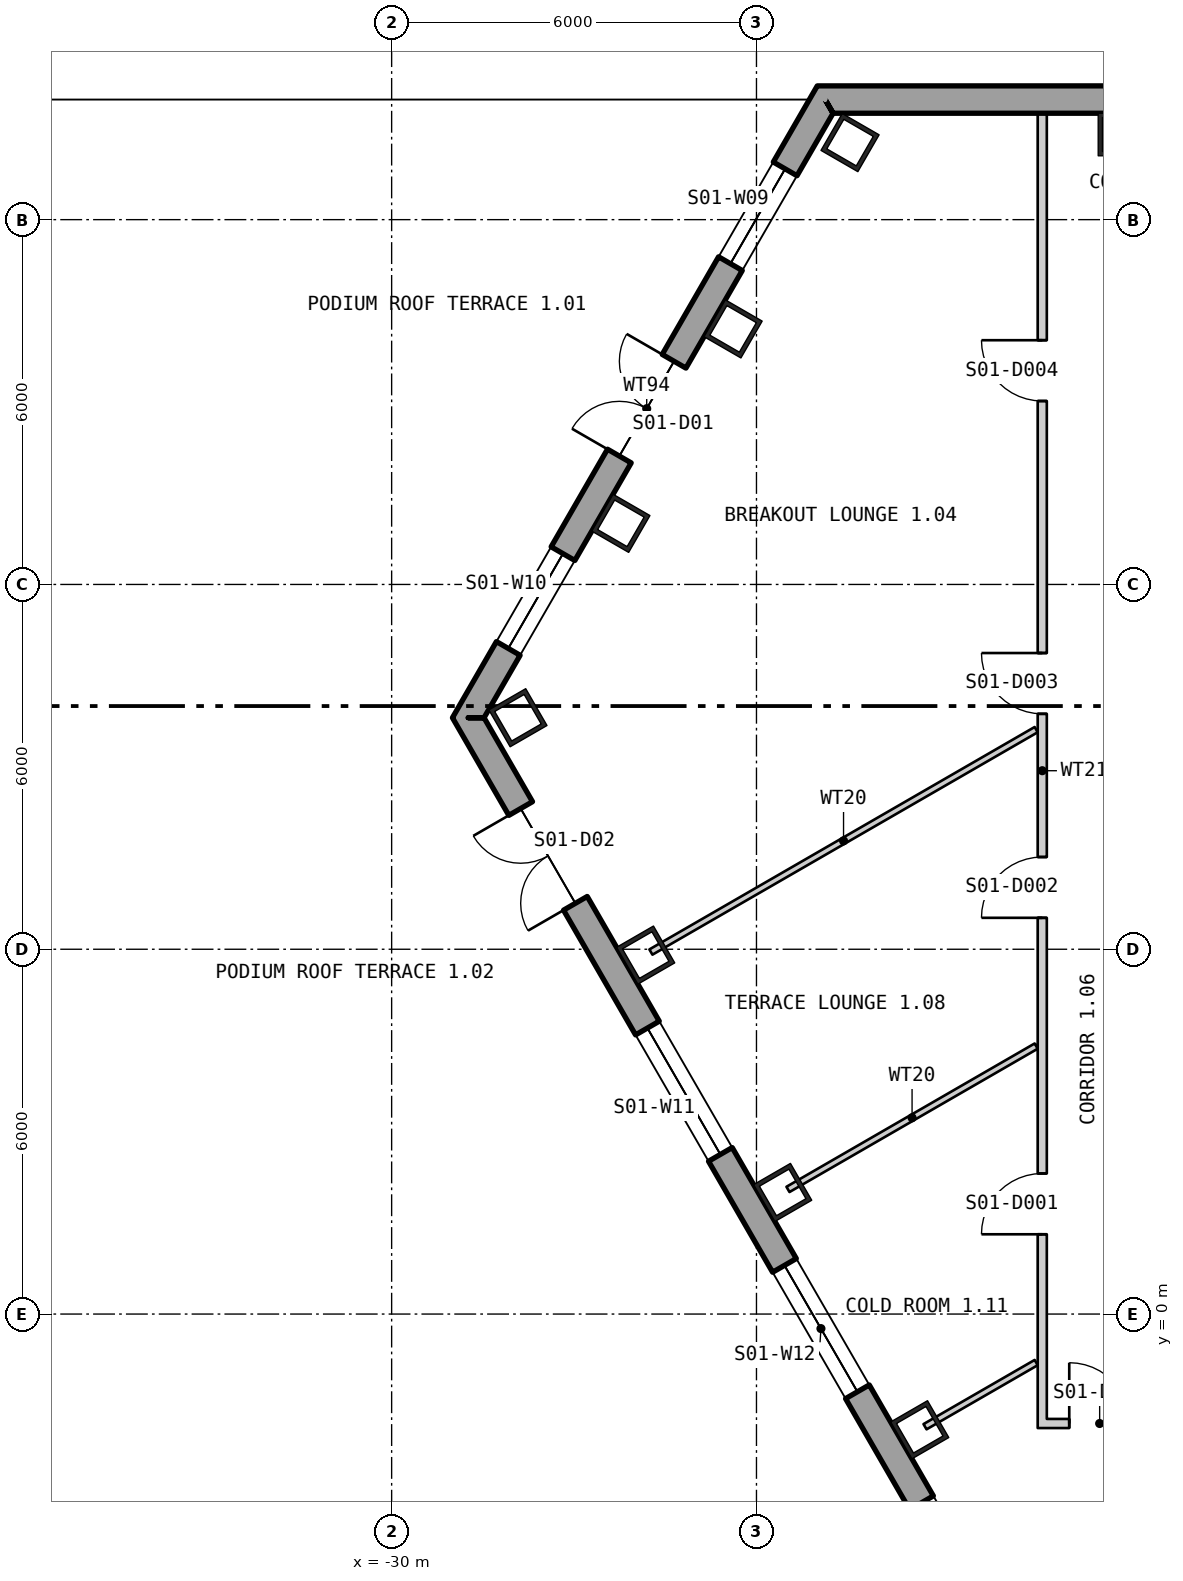
"""IFC4 building model, lengths in metres.
Left out: names, types, materials, properties, quantities, classifications, styles, units other than length and angle.
Written with IfcOpenShell. Run it as: python <this file> out.ifc"""

import sys

from ifc_helpers import new_model, si_unit, direction, frame, frame_2d, origin, origin_2d, place, context, subcontext, project, spatial, polyline, rectangle, hollow_rectangle, outline, extrude, element, fill, save


model = new_model("IFC4")
c1 = context("Model", 3, precision=1e-05, world=origin(), true_north=direction((0.0, 1.0)))
c2 = subcontext(c1, "Body", "Model", "MODEL_VIEW")
j1 = project(units=[si_unit("LENGTHUNIT", "METRE"), si_unit("PLANEANGLEUNIT", "RADIAN")], contexts=[c1])
p1 = place(None, origin())
s1 = spatial("IfcSite", under=j1, at=p1, CompositionType="ELEMENT")
p2 = place(p1, origin())
s2 = spatial("IfcBuilding", under=s1, at=p2, CompositionType="ELEMENT")
p3 = place(p2, frame((0.0, 0.0, 28.8)))
s3 = spatial("IfcBuildingStorey", under=s2, at=p3, CompositionType="ELEMENT", Elevation=28.8)
p4 = place(p3, frame((-18.03, 19.4, -0.85), z_axis=(0.0, 0.0, 1.0), x_axis=(-1.0, 0.0, 0.0)))
e1 = element("IfcColumn", 1, at=p4, inside=s3, PredefinedType="COLUMN", context=c2, shape_type="SweptSolid", body=[
    extrude(hollow_rectangle(XDim=0.7, YDim=0.7, WallThickness=0.07, at=origin_2d()), origin(), (0.0, 0.0, 1.0), 5.35),
])
p5 = place(p3, frame((-22.461, 19.267, 0.0), z_axis=(0.0, 0.0, 1.0), x_axis=(-0.5, -0.866025403784, 0.0)))
e2 = element("IfcColumn", 2, at=p5, inside=s3, PredefinedType="COLUMN", context=c2, shape_type="SweptSolid", body=[
    extrude(hollow_rectangle(XDim=0.7, YDim=0.7, WallThickness=0.07, at=origin_2d()), origin(), (0.0, 0.0, 1.0), 4.5),
])
for number, where, z_axis, x_axis in (
    (3, (-24.384, 16.203, -0.85), (0.0, 0.0, 1.0), (-0.5, -0.866, 0.0)),
    (4, (-26.23, 13.005, -0.85), (0.0, 0.0, 1.0), (-0.5, -0.866, 0.0)),
):
    element("IfcColumn", number, at=place(p3, frame(where, z_axis=z_axis, x_axis=x_axis)), inside=s3, PredefinedType="COLUMN", context=c2, shape_type="SweptSolid", body=[
        extrude(hollow_rectangle(XDim=0.7, YDim=0.7, WallThickness=0.07, at=origin_2d()), origin(), (0.0, 0.0, 1.0), 5.35),
    ])
p6 = place(p3, frame((-27.923, 9.808, 0.0), z_axis=(0.0, 0.0, 1.0), x_axis=(0.5, -0.866025403784, 0.0)))
e5 = element("IfcColumn", 5, at=p6, inside=s3, PredefinedType="COLUMN", context=c2, shape_type="SweptSolid", body=[
    extrude(hollow_rectangle(XDim=0.7, YDim=0.7, WallThickness=0.07, at=origin_2d()), origin(), (0.0, 0.0, 1.0), 4.5),
])
p7 = place(p3, frame((-25.822, 5.904, -0.85), z_axis=(0.0, 0.0, 1.0), x_axis=(0.5, -0.866025403784, 0.0)))
e6 = element("IfcColumn", 6, at=p7, inside=s3, PredefinedType="COLUMN", context=c2, shape_type="SweptSolid", body=[
    extrude(hollow_rectangle(XDim=0.7, YDim=0.7, WallThickness=0.07, at=origin_2d()), origin(), (0.0, 0.0, 1.0), 5.35),
])
p8 = place(p3, frame((-23.569, 2.0, 0.0), z_axis=(0.0, 0.0, 1.0), x_axis=(0.5, -0.866025403784, 0.0)))
e7 = element("IfcColumn", 7, at=p8, inside=s3, PredefinedType="COLUMN", context=c2, shape_type="SweptSolid", body=[
    extrude(hollow_rectangle(XDim=0.7, YDim=0.7, WallThickness=0.07, at=origin_2d()), origin(), (0.0, 0.0, 1.0), 4.5),
])
p9 = place(p3, frame((-21.315, -1.903, -0.85), z_axis=(0.0, 0.0, 1.0), x_axis=(0.5, -0.866025403784, 0.0)))
e8 = element("IfcColumn", 8, at=p9, inside=s3, PredefinedType="COLUMN", context=c2, shape_type="SweptSolid", body=[
    extrude(hollow_rectangle(XDim=0.7, YDim=0.7, WallThickness=0.07, at=origin_2d()), origin(), (0.0, 0.0, 1.0), 5.35),
])
p10 = place(p3, frame((22.87, 19.975, -0.4), z_axis=(0.0, 0.0, 1.0), x_axis=(-1.0, 0.0, 0.0)))
e9 = element("IfcWall", 9, at=p10, inside=s3, PredefinedType="SOLIDWALL", context=c2, shape_type="SweptSolid", body=[
    extrude(outline(polyline([(-0.13, -0.225), (45.87, -0.225), (45.61, 0.225), (0.13, 0.225), (-0.13, -0.225)])), origin(), (0.0, 0.0, 1.0), 4.5),
])
p11 = place(p10, frame((5.893, 0.0, 1.3)))
e10 = element("IfcOpeningElement", 10, at=p11, cuts=e9, PredefinedType="OPENING", context=c2, shape_type="SweptSolid", body=[
    extrude(rectangle(XDim=2.4, YDim=2.6, at=frame_2d((1.2, 1.3))), frame((0.0, 0.235, 0.0), z_axis=(0.0, -1.0, 0.0), x_axis=(1.0, 0.0, 0.0)), (0.0, 0.0, 1.0), 0.47),
])
p12 = place(p10, frame((10.401, 0.0, 1.3)))
e11 = element("IfcOpeningElement", 11, at=p12, cuts=e9, PredefinedType="OPENING", context=c2, shape_type="SweptSolid", body=[
    extrude(rectangle(XDim=2.4, YDim=2.6, at=frame_2d((1.2, 1.3))), frame((0.0, 0.235, 0.0), z_axis=(0.0, -1.0, 0.0), x_axis=(1.0, 0.0, 0.0)), (0.0, 0.0, 1.0), 0.47),
])
p13 = place(p10, frame((14.909, 0.0, 1.3)))
e12 = element("IfcOpeningElement", 12, at=p13, cuts=e9, PredefinedType="OPENING", context=c2, shape_type="SweptSolid", body=[
    extrude(rectangle(XDim=2.4, YDim=2.6, at=frame_2d((1.2, 1.3))), frame((0.0, 0.235, 0.0), z_axis=(0.0, -1.0, 0.0), x_axis=(1.0, 0.0, 0.0)), (0.0, 0.0, 1.0), 0.47),
])
p14 = place(p10, frame((19.416, 0.0, 1.3)))
e13 = element("IfcOpeningElement", 13, at=p14, cuts=e9, PredefinedType="OPENING", context=c2, shape_type="SweptSolid", body=[
    extrude(rectangle(XDim=2.4, YDim=2.6, at=frame_2d((1.2, 1.3))), frame((0.0, 0.235, 0.0), z_axis=(0.0, -1.0, 0.0), x_axis=(1.0, 0.0, 0.0)), (0.0, 0.0, 1.0), 0.47),
])
p15 = place(p10, frame((23.924, 0.0, 1.3)))
e14 = element("IfcOpeningElement", 14, at=p15, cuts=e9, PredefinedType="OPENING", context=c2, shape_type="SweptSolid", body=[
    extrude(rectangle(XDim=2.4, YDim=2.6, at=frame_2d((1.2, 1.3))), frame((0.0, 0.235, 0.0), z_axis=(0.0, -1.0, 0.0), x_axis=(1.0, 0.0, 0.0)), (0.0, 0.0, 1.0), 0.47),
])
p16 = place(p10, frame((28.431, 0.0, 1.3)))
e15 = element("IfcOpeningElement", 15, at=p16, cuts=e9, PredefinedType="OPENING", context=c2, shape_type="SweptSolid", body=[
    extrude(rectangle(XDim=2.4, YDim=2.6, at=frame_2d((1.2, 1.3))), frame((0.0, 0.235, 0.0), z_axis=(0.0, -1.0, 0.0), x_axis=(1.0, 0.0, 0.0)), (0.0, 0.0, 1.0), 0.47),
])
p17 = place(p10, frame((32.939, 0.0, 1.3)))
e16 = element("IfcOpeningElement", 16, at=p17, cuts=e9, PredefinedType="OPENING", context=c2, shape_type="SweptSolid", body=[
    extrude(rectangle(XDim=2.4, YDim=2.6, at=frame_2d((1.2, 1.3))), frame((0.0, 0.235, 0.0), z_axis=(0.0, -1.0, 0.0), x_axis=(1.0, 0.0, 0.0)), (0.0, 0.0, 1.0), 0.47),
])
p18 = place(p10, frame((37.447, 0.0, 1.3)))
e17 = element("IfcOpeningElement", 17, at=p18, cuts=e9, PredefinedType="OPENING", context=c2, shape_type="SweptSolid", body=[
    extrude(rectangle(XDim=2.4, YDim=2.6, at=frame_2d((1.2, 1.3))), frame((0.0, 0.235, 0.0), z_axis=(0.0, -1.0, 0.0), x_axis=(1.0, 0.0, 0.0)), (0.0, 0.0, 1.0), 0.47),
])
p19 = place(p3, frame((-22.87, 19.975, -0.23), z_axis=(0.0, 0.0, 1.0), x_axis=(-0.500000422144, -0.866025160059, 0.0)))
e18 = element("IfcWall", 18, at=p19, inside=s3, PredefinedType="SOLIDWALL", context=c2, shape_type="SweptSolid", body=[
    extrude(outline(polyline([(-0.13, -0.225), (11.87, -0.225), (11.61, 0.225), (0.13, 0.225), (-0.13, -0.225)])), origin(), (0.0, 0.0, 1.0), 4.33),
])
p20 = place(p19, frame((1.316, 0.0, 1.13)))
e19 = element("IfcOpeningElement", 19, at=p20, cuts=e18, PredefinedType="OPENING", context=c2, shape_type="SweptSolid", body=[
    extrude(rectangle(XDim=1.8, YDim=2.6, at=frame_2d((0.9, 1.3))), frame((0.0, 0.235, 0.0), z_axis=(0.0, -1.0, 0.0), x_axis=(1.0, 0.0, 0.0)), (0.0, 0.0, 1.0), 0.47),
])
p21 = place(p19, frame((4.97, 0.0, 0.23)))
e20 = element("IfcOpeningElement", 20, at=p21, cuts=e18, PredefinedType="OPENING", context=c2, shape_type="SweptSolid", body=[
    extrude(rectangle(XDim=1.8, YDim=2.4, at=frame_2d((0.9, 1.2))), frame((0.0, 0.235, 0.0), z_axis=(0.0, -1.0, 0.0), x_axis=(1.0, 0.0, 0.0)), (0.0, 0.0, 1.0), 0.47),
])
p22 = place(p19, frame((8.624, 0.0, 1.13)))
e21 = element("IfcOpeningElement", 21, at=p22, cuts=e18, PredefinedType="OPENING", context=c2, shape_type="SweptSolid", body=[
    extrude(rectangle(XDim=1.8, YDim=2.6, at=frame_2d((0.9, 1.3))), frame((0.0, 0.235, 0.0), z_axis=(0.0, -1.0, 0.0), x_axis=(1.0, 0.0, 0.0)), (0.0, 0.0, 1.0), 0.47),
])
p23 = place(p3, frame((-28.74, 9.808, -0.23), z_axis=(0.0, 0.0, 1.0), x_axis=(0.499999764979, -0.866025539474, 0.0)))
e22 = element("IfcWall", 22, at=p23, inside=s3, PredefinedType="SOLIDWALL", context=c2, shape_type="SweptSolid", body=[
    extrude(outline(polyline([(-0.13, -0.225), (45.87, -0.225), (45.61, 0.225), (0.13, 0.225), (-0.13, -0.225)])), origin(), (0.0, 0.0, 1.0), 4.55),
])
p24 = place(p23, frame((1.724, 0.0, 0.23)))
e23 = element("IfcOpeningElement", 23, at=p24, cuts=e22, PredefinedType="OPENING", context=c2, shape_type="SweptSolid", body=[
    extrude(rectangle(XDim=1.8, YDim=2.4, at=frame_2d((0.9, 1.2))), frame((0.0, 0.235, 0.0), z_axis=(0.0, -1.0, 0.0), x_axis=(1.0, 0.0, 0.0)), (0.0, 0.0, 1.0), 0.47),
])
p25 = place(p23, frame((5.893, 0.0, 1.13)))
e24 = element("IfcOpeningElement", 24, at=p25, cuts=e22, PredefinedType="OPENING", context=c2, shape_type="SweptSolid", body=[
    extrude(rectangle(XDim=2.4, YDim=2.6, at=frame_2d((1.2, 1.3))), frame((0.0, 0.235, 0.0), z_axis=(0.0, -1.0, 0.0), x_axis=(1.0, 0.0, 0.0)), (0.0, 0.0, 1.0), 0.47),
])
p26 = place(p23, frame((10.401, 0.0, 1.13)))
e25 = element("IfcOpeningElement", 25, at=p26, cuts=e22, PredefinedType="OPENING", context=c2, shape_type="SweptSolid", body=[
    extrude(rectangle(XDim=2.4, YDim=2.6, at=frame_2d((1.2, 1.3))), frame((0.0, 0.235, 0.0), z_axis=(0.0, -1.0, 0.0), x_axis=(1.0, 0.0, 0.0)), (0.0, 0.0, 1.0), 0.47),
])
p27 = place(p23, frame((14.909, 0.0, 1.13)))
e26 = element("IfcOpeningElement", 26, at=p27, cuts=e22, PredefinedType="OPENING", context=c2, shape_type="SweptSolid", body=[
    extrude(rectangle(XDim=2.4, YDim=2.6, at=frame_2d((1.2, 1.3))), frame((0.0, 0.235, 0.0), z_axis=(0.0, -1.0, 0.0), x_axis=(1.0, 0.0, 0.0)), (0.0, 0.0, 1.0), 0.47),
])
p28 = place(p23, frame((19.416, 0.0, 1.13)))
e27 = element("IfcOpeningElement", 27, at=p28, cuts=e22, PredefinedType="OPENING", context=c2, shape_type="SweptSolid", body=[
    extrude(rectangle(XDim=2.4, YDim=2.6, at=frame_2d((1.2, 1.3))), frame((0.0, 0.235, 0.0), z_axis=(0.0, -1.0, 0.0), x_axis=(1.0, 0.0, 0.0)), (0.0, 0.0, 1.0), 0.47),
])
p29 = place(p23, frame((23.924, 0.0, 1.13)))
e28 = element("IfcOpeningElement", 28, at=p29, cuts=e22, PredefinedType="OPENING", context=c2, shape_type="SweptSolid", body=[
    extrude(rectangle(XDim=2.4, YDim=2.6, at=frame_2d((1.2, 1.3))), frame((0.0, 0.235, 0.0), z_axis=(0.0, -1.0, 0.0), x_axis=(1.0, 0.0, 0.0)), (0.0, 0.0, 1.0), 0.47),
])
p30 = place(p23, frame((28.431, 0.0, 1.13)))
e29 = element("IfcOpeningElement", 29, at=p30, cuts=e22, PredefinedType="OPENING", context=c2, shape_type="SweptSolid", body=[
    extrude(rectangle(XDim=2.4, YDim=2.6, at=frame_2d((1.2, 1.3))), frame((0.0, 0.235, 0.0), z_axis=(0.0, -1.0, 0.0), x_axis=(1.0, 0.0, 0.0)), (0.0, 0.0, 1.0), 0.47),
])
p31 = place(p23, frame((33.239, 0.0, 0.23)))
e30 = element("IfcOpeningElement", 30, at=p31, cuts=e22, PredefinedType="OPENING", context=c2, shape_type="SweptSolid", body=[
    extrude(rectangle(XDim=1.8, YDim=2.4, at=frame_2d((0.9, 1.2))), frame((0.0, 0.235, 0.0), z_axis=(0.0, -1.0, 0.0), x_axis=(1.0, 0.0, 0.0)), (0.0, 0.0, 1.0), 0.47),
])
p32 = place(p23, frame((37.447, 0.0, 1.13)))
e31 = element("IfcOpeningElement", 31, at=p32, cuts=e22, PredefinedType="OPENING", context=c2, shape_type="SweptSolid", body=[
    extrude(rectangle(XDim=2.4, YDim=2.6, at=frame_2d((1.2, 1.3))), frame((0.0, 0.235, 0.0), z_axis=(0.0, -1.0, 0.0), x_axis=(1.0, 0.0, 0.0)), (0.0, 0.0, 1.0), 0.47),
])
p33 = place(p23, frame((41.916, 0.0, 1.13)))
e32 = element("IfcOpeningElement", 32, at=p33, cuts=e22, PredefinedType="OPENING", context=c2, shape_type="SweptSolid", body=[
    extrude(rectangle(XDim=2.4, YDim=2.6, at=frame_2d((1.2, 1.3))), frame((0.0, 0.235, 0.0), z_axis=(0.0, -1.0, 0.0), x_axis=(1.0, 0.0, 0.0)), (0.0, 0.0, 1.0), 0.47),
])
p34 = place(p3, frame((-23.0, 19.975, -0.4), z_axis=(0.0, 0.0, 1.0), x_axis=(-1.0, 0.0, 0.0)))
e33 = element("IfcWall", 33, at=p34, inside=s3, PredefinedType="PARAPET", context=c2, shape_type="SweptSolid", body=[
    extrude(outline(polyline([(0.0, -0.15), (16.0, -0.15), (15.7, 0.15), (0.0, 0.15), (0.0, -0.15)])), origin(), (0.0, 0.0, 1.0), 1.5),
])
p35 = place(p3, frame((-25.736, 5.954, 0.0), z_axis=(0.0, 0.0, 1.0), x_axis=(0.866030807744, 0.499990639951, 0.0)))
e34 = element("IfcWall", 34, at=p35, inside=s3, PredefinedType="PARTITIONING", context=c2, shape_type="SweptSolid", body=[
    extrude(rectangle(XDim=7.316, YDim=0.1, at=frame_2d((3.658, 0.0))), origin(), (0.0, 0.0, 1.0), 4.3),
])
p36 = place(p3, frame((-23.482, 2.05, 0.0), z_axis=(0.0, 0.0, 1.0), x_axis=(0.866001867101, 0.500040764516, 0.0)))
e35 = element("IfcWall", 35, at=p36, inside=s3, PredefinedType="PARTITIONING", context=c2, shape_type="SweptSolid", body=[
    extrude(rectangle(XDim=4.714, YDim=0.1, at=frame_2d((2.357, 0.0))), origin(), (0.0, 0.0, 1.0), 4.3),
])
p37 = place(p3, frame((-21.228, -1.853, 0.0), z_axis=(0.0, 0.0, 1.0), x_axis=(0.866106696208, 0.499859170951, 0.0)))
e36 = element("IfcWall", 36, at=p37, inside=s3, PredefinedType="PARTITIONING", context=c2, shape_type="SweptSolid", body=[
    extrude(rectangle(XDim=2.111, YDim=0.1, at=frame_2d((1.055, 0.0))), origin(), (0.0, 0.0, 1.0), 4.3),
])
p38 = place(p3, frame((-19.3, -1.875, 0.0), z_axis=(0.0, 0.0, 1.0), x_axis=(0.0, 1.0, 0.0)))
e37 = element("IfcWall", 37, at=p38, inside=s3, PredefinedType="PARTITIONING", context=c2, shape_type="SweptSolid", body=[
    extrude(rectangle(XDim=21.623, YDim=0.15, at=frame_2d((10.812, 0.0))), origin(), (0.0, 0.0, 1.0), 4.3),
])
p39 = place(p38, frame((3.187, 0.0, 0.0)))
e38 = element("IfcOpeningElement", 38, at=p39, cuts=e37, PredefinedType="OPENING", context=c2, shape_type="SweptSolid", body=[
    extrude(rectangle(XDim=1.0, YDim=2.1, at=frame_2d((0.5, 1.05))), frame((0.0, 0.085, 0.0), z_axis=(0.0, -1.0, 0.0), x_axis=(1.0, 0.0, 0.0)), (0.0, 0.0, 1.0), 0.17),
])
p40 = place(p38, frame((8.392, 0.0, 0.0)))
e39 = element("IfcOpeningElement", 39, at=p40, cuts=e37, PredefinedType="OPENING", context=c2, shape_type="SweptSolid", body=[
    extrude(rectangle(XDim=1.0, YDim=2.1, at=frame_2d((0.5, 1.05))), frame((0.0, 0.085, 0.0), z_axis=(0.0, -1.0, 0.0), x_axis=(1.0, 0.0, 0.0)), (0.0, 0.0, 1.0), 0.17),
])
p41 = place(p38, frame((11.747, 0.0, 0.0)))
e40 = element("IfcOpeningElement", 40, at=p41, cuts=e37, PredefinedType="OPENING", context=c2, shape_type="SweptSolid", body=[
    extrude(rectangle(XDim=1.0, YDim=2.1, at=frame_2d((0.5, 1.05))), frame((0.0, 0.085, 0.0), z_axis=(0.0, -1.0, 0.0), x_axis=(1.0, 0.0, 0.0)), (0.0, 0.0, 1.0), 0.17),
])
p42 = place(p38, frame((16.892, 0.0, 0.0)))
e41 = element("IfcOpeningElement", 41, at=p42, cuts=e37, PredefinedType="OPENING", context=c2, shape_type="SweptSolid", body=[
    extrude(rectangle(XDim=1.0, YDim=2.1, at=frame_2d((0.5, 1.05))), frame((0.0, 0.085, 0.0), z_axis=(0.0, -1.0, 0.0), x_axis=(1.0, 0.0, 0.0)), (0.0, 0.0, 1.0), 0.17),
])
p43 = place(p3, frame((-19.225, -1.8, 0.0), z_axis=(0.0, 0.0, 1.0), x_axis=(1.0, 0.0, 0.0)))
e42 = element("IfcWall", 42, at=p43, inside=s3, PredefinedType="PARTITIONING", context=c2, shape_type="SweptSolid", body=[
    extrude(rectangle(XDim=11.15, YDim=0.15, at=frame_2d((5.575, 0.0))), origin(), (0.0, 0.0, 1.0), 4.3),
])
p44 = place(p43, frame((0.369, 0.0, 0.0)))
e43 = element("IfcOpeningElement", 43, at=p44, cuts=e42, PredefinedType="OPENING", context=c2, shape_type="SweptSolid", body=[
    extrude(rectangle(XDim=1.0, YDim=2.1, at=frame_2d((0.5, 1.05))), frame((0.0, 0.085, 0.0), z_axis=(0.0, -1.0, 0.0), x_axis=(1.0, 0.0, 0.0)), (0.0, 0.0, 1.0), 0.17),
])
p45 = place(p20, origin())
e44 = element("IfcWindow", 44, at=p45, inside=s3, PartitioningType="SINGLE_PANEL", PredefinedType="WINDOW", context=c2, shape_type="SweptSolid", body=[
    extrude(rectangle(XDim=1.8, YDim=2.6, at=frame_2d((0.9, 1.3))), frame((0.0, 0.105, 0.0), z_axis=(0.0, -1.0, 0.0), x_axis=(1.0, 0.0, 0.0)), (0.0, 0.0, 1.0), 0.06),
])
fill(e19, e44)
p46 = place(p21, frame((1.8, 0.0, 0.0), z_axis=(0.0, 0.0, 1.0), x_axis=(-1.0, 0.0, 0.0)))
e45 = element("IfcDoor", 45, at=p46, inside=s3, OperationType="DOUBLE_DOOR_SINGLE_SWING", PredefinedType="DOOR", context=c2, shape_type="SweptSolid", body=[
    extrude(rectangle(XDim=1.8, YDim=2.4, at=frame_2d((0.9, 1.2))), frame((0.0, 0.025, 0.0), z_axis=(0.0, -1.0, 0.0), x_axis=(1.0, 0.0, 0.0)), (0.0, 0.0, 1.0), 0.05),
])
fill(e20, e45)
p47 = place(p22, origin())
e46 = element("IfcWindow", 46, at=p47, inside=s3, PartitioningType="SINGLE_PANEL", PredefinedType="WINDOW", context=c2, shape_type="SweptSolid", body=[
    extrude(rectangle(XDim=1.8, YDim=2.6, at=frame_2d((0.9, 1.3))), frame((0.0, 0.105, 0.0), z_axis=(0.0, -1.0, 0.0), x_axis=(1.0, 0.0, 0.0)), (0.0, 0.0, 1.0), 0.06),
])
fill(e21, e46)
p48 = place(p24, frame((1.8, 0.0, 0.0), z_axis=(0.0, 0.0, 1.0), x_axis=(-1.0, 0.0, 0.0)))
e47 = element("IfcDoor", 47, at=p48, inside=s3, OperationType="DOUBLE_DOOR_SINGLE_SWING", PredefinedType="DOOR", context=c2, shape_type="SweptSolid", body=[
    extrude(rectangle(XDim=1.8, YDim=2.4, at=frame_2d((0.9, 1.2))), frame((0.0, 0.025, 0.0), z_axis=(0.0, -1.0, 0.0), x_axis=(1.0, 0.0, 0.0)), (0.0, 0.0, 1.0), 0.05),
])
fill(e23, e47)
p49 = place(p25, origin())
e48 = element("IfcWindow", 48, at=p49, inside=s3, PartitioningType="SINGLE_PANEL", PredefinedType="WINDOW", context=c2, shape_type="SweptSolid", body=[
    extrude(rectangle(XDim=2.4, YDim=2.6, at=frame_2d((1.2, 1.3))), frame((0.0, 0.105, 0.0), z_axis=(0.0, -1.0, 0.0), x_axis=(1.0, 0.0, 0.0)), (0.0, 0.0, 1.0), 0.06),
])
fill(e24, e48)
p50 = place(p26, origin())
e49 = element("IfcWindow", 49, at=p50, inside=s3, PartitioningType="SINGLE_PANEL", PredefinedType="WINDOW", context=c2, shape_type="SweptSolid", body=[
    extrude(rectangle(XDim=2.4, YDim=2.6, at=frame_2d((1.2, 1.3))), frame((0.0, 0.105, 0.0), z_axis=(0.0, -1.0, 0.0), x_axis=(1.0, 0.0, 0.0)), (0.0, 0.0, 1.0), 0.06),
])
fill(e25, e49)
p51 = place(p27, origin())
e50 = element("IfcWindow", 50, at=p51, inside=s3, PartitioningType="SINGLE_PANEL", PredefinedType="WINDOW", context=c2, shape_type="SweptSolid", body=[
    extrude(rectangle(XDim=2.4, YDim=2.6, at=frame_2d((1.2, 1.3))), frame((0.0, 0.105, 0.0), z_axis=(0.0, -1.0, 0.0), x_axis=(1.0, 0.0, 0.0)), (0.0, 0.0, 1.0), 0.06),
])
fill(e26, e50)
p52 = place(p39, origin())
e51 = element("IfcDoor", 51, at=p52, inside=s3, OperationType="SINGLE_SWING_RIGHT", PredefinedType="DOOR", context=c2, shape_type="SweptSolid", body=[
    extrude(rectangle(XDim=1.0, YDim=2.1, at=frame_2d((0.5, 1.05))), frame((0.0, 0.025, 0.0), z_axis=(0.0, -1.0, 0.0), x_axis=(1.0, 0.0, 0.0)), (0.0, 0.0, 1.0), 0.05),
])
fill(e38, e51)
p53 = place(p40, origin())
e52 = element("IfcDoor", 52, at=p53, inside=s3, OperationType="SINGLE_SWING_RIGHT", PredefinedType="DOOR", context=c2, shape_type="SweptSolid", body=[
    extrude(rectangle(XDim=1.0, YDim=2.1, at=frame_2d((0.5, 1.05))), frame((0.0, 0.025, 0.0), z_axis=(0.0, -1.0, 0.0), x_axis=(1.0, 0.0, 0.0)), (0.0, 0.0, 1.0), 0.05),
])
fill(e39, e52)
p54 = place(p41, origin())
e53 = element("IfcDoor", 53, at=p54, inside=s3, OperationType="SINGLE_SWING_LEFT", PredefinedType="DOOR", context=c2, shape_type="SweptSolid", body=[
    extrude(rectangle(XDim=1.0, YDim=2.1, at=frame_2d((0.5, 1.05))), frame((0.0, 0.025, 0.0), z_axis=(0.0, -1.0, 0.0), x_axis=(1.0, 0.0, 0.0)), (0.0, 0.0, 1.0), 0.05),
])
fill(e40, e53)
p55 = place(p42, origin())
e54 = element("IfcDoor", 54, at=p55, inside=s3, OperationType="SINGLE_SWING_LEFT", PredefinedType="DOOR", context=c2, shape_type="SweptSolid", body=[
    extrude(rectangle(XDim=1.0, YDim=2.1, at=frame_2d((0.5, 1.05))), frame((0.0, 0.025, 0.0), z_axis=(0.0, -1.0, 0.0), x_axis=(1.0, 0.0, 0.0)), (0.0, 0.0, 1.0), 0.05),
])
fill(e41, e54)
p56 = place(p44, origin())
e55 = element("IfcDoor", 55, at=p56, inside=s3, OperationType="SINGLE_SWING_RIGHT", PredefinedType="DOOR", context=c2, shape_type="SweptSolid", body=[
    extrude(rectangle(XDim=1.0, YDim=2.1, at=frame_2d((0.5, 1.05))), frame((0.0, 0.025, 0.0), z_axis=(0.0, -1.0, 0.0), x_axis=(1.0, 0.0, 0.0)), (0.0, 0.0, 1.0), 0.05),
])
fill(e43, e55)
save(model, sys.argv[1])
